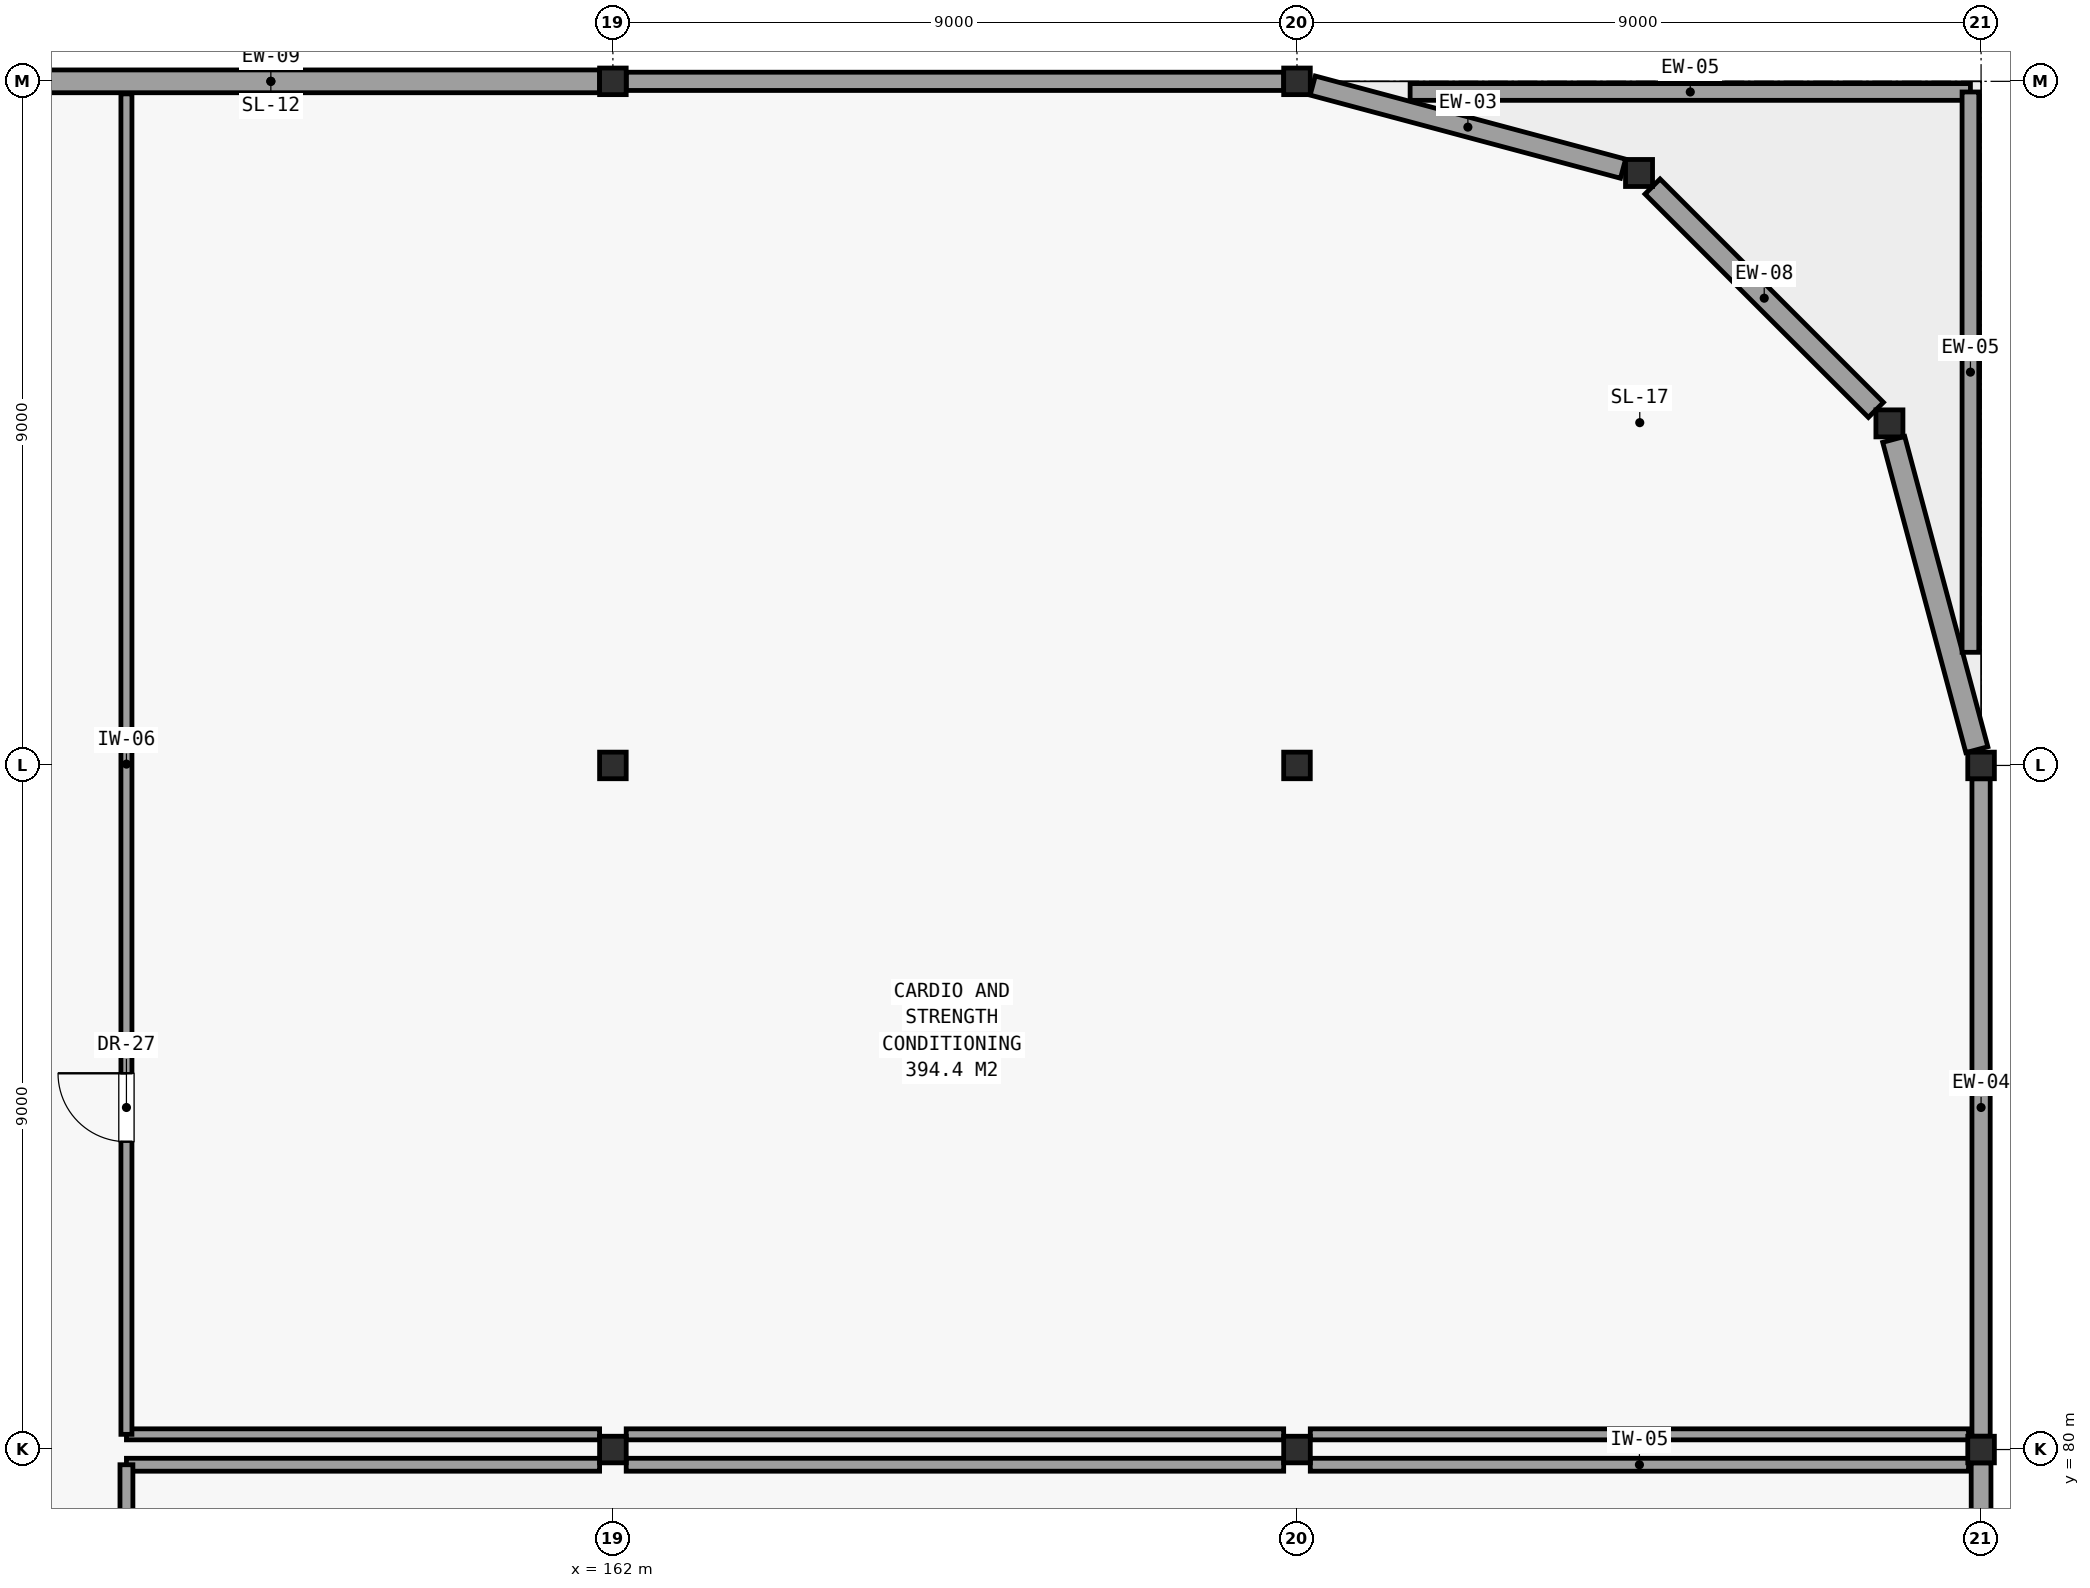
"""IFC4 building model, lengths in metres.
Left out: names, types, materials, properties, quantities, classifications, styles, units other than length and angle.
Written with IfcOpenShell. Run it as: python <this file> out.ifc"""

import sys

from ifc_helpers import new_model, si_unit, direction, frame, frame_2d, origin, origin_2d, place, context, subcontext, project, spatial, rectangle, hollow_rectangle, hollow_circle, extrude, element, fill, save


model = new_model("IFC4")
c1 = context("Model", 3, precision=1e-05, world=origin(), true_north=direction((0.0, 1.0)))
c2 = subcontext(c1, "Body", "Model", "MODEL_VIEW")
j1 = project(units=[si_unit("LENGTHUNIT", "METRE"), si_unit("PLANEANGLEUNIT", "RADIAN")], contexts=[c1])
p1 = place(None, origin())
s1 = spatial("IfcSite", under=j1, at=p1, CompositionType="ELEMENT")
p2 = place(p1, origin())
s2 = spatial("IfcBuilding", under=s1, at=p2, CompositionType="ELEMENT")
p3 = place(p2, frame((0.0, 0.0, 21.9)))
s3 = spatial("IfcBuildingStorey", under=s2, at=p3, CompositionType="ELEMENT", Elevation=21.9)
for number, where, z_axis, x_axis in (
    (1, (162.0, 80.0, 0.0), (0.0, 0.0, 1.0), (1.0, 0.0, 0.0)),
    (2, (162.0, 89.0, 0.0), (0.0, 0.0, 1.0), (1.0, 0.0, 0.0)),
    (3, (162.0, 98.0, 0.0), (0.0, 0.0, 1.0), (1.0, 0.0, 0.0)),
    (4, (171.0, 80.0, 0.0), (0.0, 0.0, 1.0), (1.0, 0.0, 0.0)),
    (5, (171.0, 89.0, 0.0), (0.0, 0.0, 1.0), (1.0, 0.0, 0.0)),
    (6, (171.0, 98.0, 0.0), (0.0, 0.0, 1.0), (1.0, 0.0, 0.0)),
):
    element("IfcColumn", number, at=place(p3, frame(where, z_axis=z_axis, x_axis=x_axis)), inside=s3, PredefinedType="COLUMN", context=c2, shape_type="SweptSolid", body=[
        extrude(hollow_rectangle(XDim=0.35, YDim=0.35, WallThickness=0.016, at=origin_2d()), origin(), (0.0, 0.0, 1.0), 4.2),
    ])
for number, where, z_axis, x_axis in (
    (7, (175.5, 96.794, 0.0), (0.0, 0.0, 1.0), (1.0, 0.0, 0.0)),
    (8, (178.794, 93.5, 0.0), (0.0, 0.0, 1.0), (1.0, 0.0, 0.0)),
):
    element("IfcColumn", number, at=place(p3, frame(where, z_axis=z_axis, x_axis=x_axis)), inside=s3, PredefinedType="COLUMN", context=c2, shape_type="SweptSolid", body=[
        extrude(hollow_circle(Radius=0.178, WallThickness=0.013, at=origin_2d()), origin(), (0.0, 0.0, 1.0), 4.2),
    ])
for number, where, z_axis, x_axis in (
    (9, (180.0, 80.0, 0.0), (0.0, 0.0, 1.0), (1.0, 0.0, 0.0)),
    (10, (180.0, 89.0, 0.0), (0.0, 0.0, 1.0), (1.0, 0.0, 0.0)),
):
    element("IfcColumn", number, at=place(p3, frame(where, z_axis=z_axis, x_axis=x_axis)), inside=s3, PredefinedType="COLUMN", context=c2, shape_type="SweptSolid", body=[
        extrude(hollow_rectangle(XDim=0.35, YDim=0.35, WallThickness=0.016, at=origin_2d()), origin(), (0.0, 0.0, 1.0), 4.2),
    ])
p4 = place(p3, frame((180.0, 71.175, 0.0), z_axis=(0.0, 0.0, 1.0), x_axis=(0.0, 1.0, 0.0)))
e11 = element("IfcWall", 11, at=p4, inside=s3, PredefinedType="SOLIDWALL", context=c2, shape_type="SweptSolid", body=[
    extrude(rectangle(XDim=8.65, YDim=0.26, at=frame_2d((4.325, 0.0))), origin(), (0.0, 0.0, 1.0), 3.24),
])
p5 = place(p3, frame((180.0, 80.175, 0.0), z_axis=(0.0, 0.0, 1.0), x_axis=(0.0, 1.0, 0.0)))
e12 = element("IfcWall", 12, at=p5, inside=s3, PredefinedType="SOLIDWALL", context=c2, shape_type="SweptSolid", body=[
    extrude(rectangle(XDim=8.65, YDim=0.24, at=frame_2d((4.325, 0.0))), origin(), (0.0, 0.0, 1.0), 3.24),
])
p6 = place(p3, frame((179.945, 89.207, 0.0), z_axis=(0.0, 0.0, 1.0), x_axis=(-0.258823661135, 0.965924589415, 0.0)))
e13 = element("IfcWall", 13, at=p6, inside=s3, PredefinedType="SOLIDWALL", context=c2, shape_type="SweptSolid", body=[
    extrude(rectangle(XDim=4.227, YDim=0.3, at=frame_2d((2.113, 0.0))), origin(), (0.0, 0.0, 1.0), 3.24),
])
p7 = place(p3, frame((178.616, 93.678, 0.0), z_axis=(0.0, 0.0, 1.0), x_axis=(-0.707106781187, 0.707106781187, 0.0)))
e14 = element("IfcWall", 14, at=p7, inside=s3, PredefinedType="SOLIDWALL", context=c2, shape_type="SweptSolid", body=[
    extrude(rectangle(XDim=4.156, YDim=0.28, at=frame_2d((2.078, 0.0))), origin(), (0.0, 0.0, 1.0), 3.54),
])
p8 = place(p3, frame((175.29, 96.851, 0.0), z_axis=(0.0, 0.0, 1.0), x_axis=(-0.965924589415, 0.258823661135, 0.0)))
e15 = element("IfcWall", 15, at=p8, inside=s3, PredefinedType="SOLIDWALL", context=c2, shape_type="SweptSolid", body=[
    extrude(rectangle(XDim=4.227, YDim=0.26, at=frame_2d((2.113, 0.0))), origin(), (0.0, 0.0, 1.0), 3.29),
])
p9 = place(p3, frame((170.825, 98.0, 0.0), z_axis=(0.0, 0.0, 1.0), x_axis=(-1.0, 0.0, 0.0)))
e16 = element("IfcWall", 16, at=p9, inside=s3, PredefinedType="SOLIDWALL", context=c2, shape_type="SweptSolid", body=[
    extrude(rectangle(XDim=8.65, YDim=0.24, at=frame_2d((4.325, 0.0))), origin(), (0.0, 0.0, 1.0), 3.29),
])
p10 = place(p3, frame((161.825, 98.0, 0.0), z_axis=(0.0, 0.0, 1.0), x_axis=(-1.0, 0.0, 0.0)))
e17 = element("IfcWall", 17, at=p10, inside=s3, PredefinedType="SOLIDWALL", context=c2, shape_type="SweptSolid", body=[
    extrude(rectangle(XDim=8.65, YDim=0.3, at=frame_2d((4.325, 0.0))), origin(), (0.0, 0.0, 1.0), 3.29),
])
for number, where, z_axis, x_axis in (
    (18, (172.488, 97.86, 0.0), (0.0, 0.0, 1.0), (1.0, 0.0, 0.0)),
    (19, (179.86, 97.86, 0.0), (0.0, 0.0, 1.0), (0.0, -1.0, 0.0)),
):
    element("IfcWall", number, at=place(p3, frame(where, z_axis=z_axis, x_axis=x_axis)), inside=s3, PredefinedType="PARAPET", context=c2, shape_type="SweptSolid", body=[
        extrude(rectangle(XDim=7.372, YDim=0.22, at=frame_2d((3.686, 0.0))), origin(), (0.0, 0.0, 1.0), 0.52),
    ])
p11 = place(p3, frame((155.6, 79.8, 0.0), z_axis=(0.0, 0.0, 1.0), x_axis=(1.0, 0.0, 0.0)))
e20 = element("IfcWall", 20, at=p11, inside=s3, PredefinedType="PARTITIONING", context=c2, shape_type="SweptSolid", body=[
    extrude(rectangle(XDim=6.225, YDim=0.17, at=frame_2d((3.112, 0.0))), origin(), (0.0, 0.0, 1.0), 3.24),
])
p12 = place(p3, frame((162.175, 79.8, 0.0), z_axis=(0.0, 0.0, 1.0), x_axis=(1.0, 0.0, 0.0)))
e21 = element("IfcWall", 21, at=p12, inside=s3, PredefinedType="PARTITIONING", context=c2, shape_type="SweptSolid", body=[
    extrude(rectangle(XDim=8.65, YDim=0.17, at=frame_2d((4.325, 0.0))), origin(), (0.0, 0.0, 1.0), 3.24),
])
p13 = place(p3, frame((171.175, 79.8, 0.0), z_axis=(0.0, 0.0, 1.0), x_axis=(1.0, 0.0, 0.0)))
e22 = element("IfcWall", 22, at=p13, inside=s3, PredefinedType="PARTITIONING", context=c2, shape_type="SweptSolid", body=[
    extrude(rectangle(XDim=8.66, YDim=0.17, at=frame_2d((4.33, 0.0))), origin(), (0.0, 0.0, 1.0), 3.24),
])
p14 = place(p3, frame((155.6, 62.2, 0.0), z_axis=(0.0, 0.0, 1.0), x_axis=(0.0, 1.0, 0.0)))
e23 = element("IfcWall", 23, at=p14, inside=s3, PredefinedType="PARTITIONING", context=c2, shape_type="SweptSolid", body=[
    extrude(rectangle(XDim=17.6, YDim=0.17, at=frame_2d((8.8, 0.0))), origin(), (0.0, 0.0, 1.0), 3.24),
])
p15 = place(p14, frame((11.925, 0.0, 0.0)))
e24 = element("IfcOpeningElement", 24, at=p15, cuts=e23, PredefinedType="OPENING", context=c2, shape_type="SweptSolid", body=[
    extrude(rectangle(XDim=2.75, YDim=2.7, at=frame_2d((1.375, 1.35))), frame((0.0, 0.096, 0.0), z_axis=(0.0, -1.0, 0.0), x_axis=(1.0, 0.0, 0.0)), (0.0, 0.0, 1.0), 0.192),
])
p16 = place(p3, frame((155.6, 80.2, 0.0), z_axis=(0.0, 0.0, 1.0), x_axis=(1.0, 0.0, 0.0)))
e25 = element("IfcWall", 25, at=p16, inside=s3, PredefinedType="PARTITIONING", context=c2, shape_type="SweptSolid", body=[
    extrude(rectangle(XDim=6.225, YDim=0.145, at=frame_2d((3.112, 0.0))), origin(), (0.0, 0.0, 1.0), 3.24),
])
p17 = place(p3, frame((162.175, 80.2, 0.0), z_axis=(0.0, 0.0, 1.0), x_axis=(1.0, 0.0, 0.0)))
e26 = element("IfcWall", 26, at=p17, inside=s3, PredefinedType="PARTITIONING", context=c2, shape_type="SweptSolid", body=[
    extrude(rectangle(XDim=8.65, YDim=0.145, at=frame_2d((4.325, 0.0))), origin(), (0.0, 0.0, 1.0), 3.24),
])
p18 = place(p3, frame((171.175, 80.2, 0.0), z_axis=(0.0, 0.0, 1.0), x_axis=(1.0, 0.0, 0.0)))
e27 = element("IfcWall", 27, at=p18, inside=s3, PredefinedType="PARTITIONING", context=c2, shape_type="SweptSolid", body=[
    extrude(rectangle(XDim=8.66, YDim=0.145, at=frame_2d((4.33, 0.0))), origin(), (0.0, 0.0, 1.0), 3.24),
])
p19 = place(p3, frame((155.6, 80.2, 0.0), z_axis=(0.0, 0.0, 1.0), x_axis=(0.0, 1.0, 0.0)))
e28 = element("IfcWall", 28, at=p19, inside=s3, PredefinedType="PARTITIONING", context=c2, shape_type="SweptSolid", body=[
    extrude(rectangle(XDim=17.635, YDim=0.145, at=frame_2d((8.817, 0.0))), origin(), (0.0, 0.0, 1.0), 3.24),
])
p20 = place(p19, frame((3.85, 0.0, 0.0)))
e29 = element("IfcOpeningElement", 29, at=p20, cuts=e28, PredefinedType="OPENING", context=c2, shape_type="SweptSolid", body=[
    extrude(rectangle(XDim=0.9, YDim=2.15, at=frame_2d((0.45, 1.075))), frame((0.0, 0.083, 0.0), z_axis=(0.0, -1.0, 0.0), x_axis=(1.0, 0.0, 0.0)), (0.0, 0.0, 1.0), 0.167),
])
p21 = place(p20, origin())
e30 = element("IfcDoor", 30, at=p21, inside=s3, OperationType="SINGLE_SWING_RIGHT", PredefinedType="DOOR", context=c2, shape_type="SweptSolid", body=[
    extrude(rectangle(XDim=0.9, YDim=2.15, at=frame_2d((0.45, 1.075))), frame((0.0, 0.025, 0.0), z_axis=(0.0, -1.0, 0.0), x_axis=(1.0, 0.0, 0.0)), (0.0, 0.0, 1.0), 0.05),
])
fill(e29, e30)
save(model, sys.argv[1])
